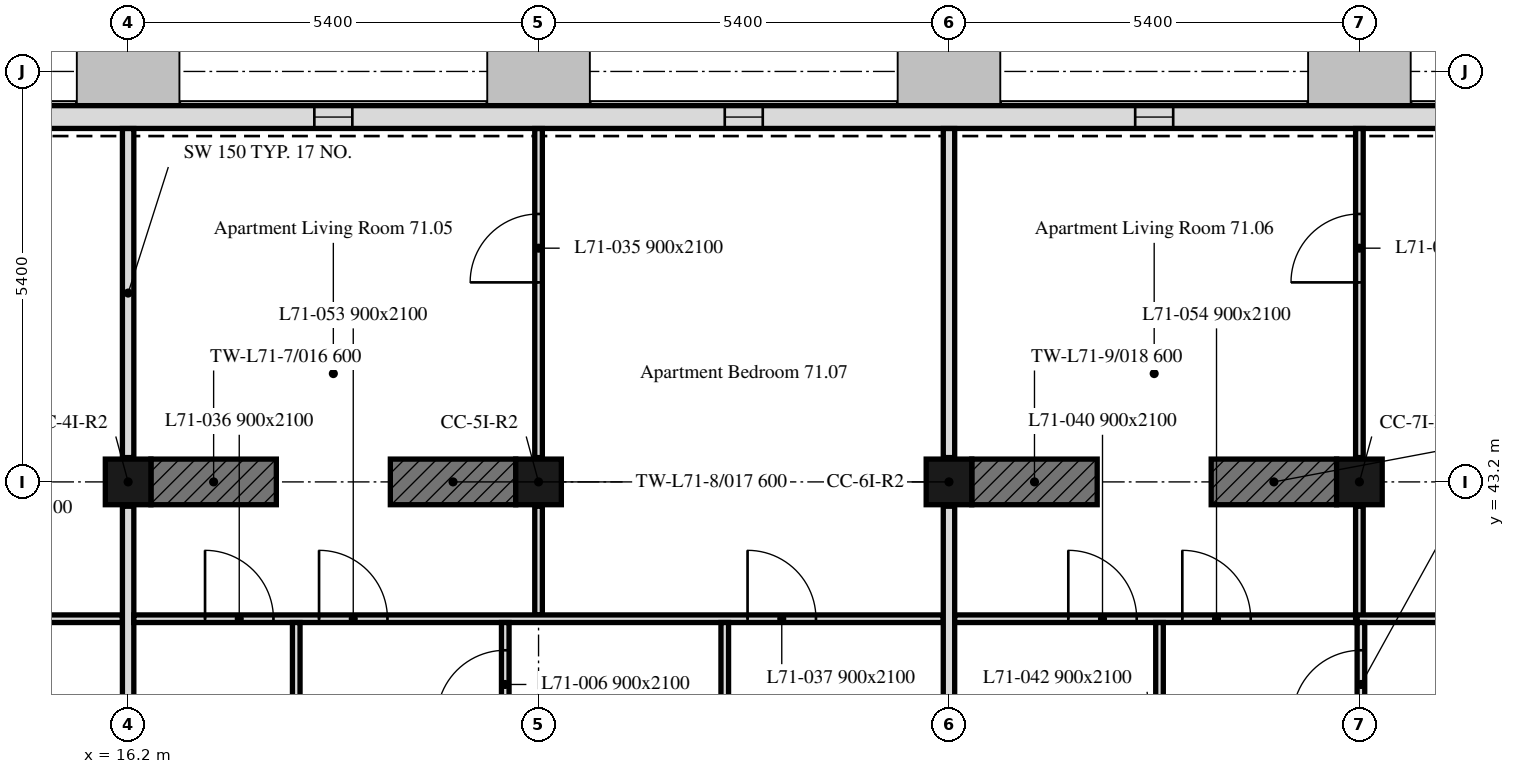
"""IFC4 building model, lengths in metres.
Left out: names, types, materials, properties, quantities, classifications, styles, units other than length and angle.
Written with IfcOpenShell. Run it as: python <this file> out.ifc"""

import sys

from ifc_helpers import new_model, si_unit, direction, frame, frame_2d, origin, origin_2d, place, context, subcontext, project, spatial, rectangle, extrude, element, fill, save


model = new_model("IFC4")
c1 = context("Model", 3, precision=1e-05, world=origin(), true_north=direction((0.0, 1.0)))
c2 = subcontext(c1, "Body", "Model", "MODEL_VIEW")
j1 = project(units=[si_unit("LENGTHUNIT", "METRE"), si_unit("PLANEANGLEUNIT", "RADIAN")], contexts=[c1])
p1 = place(None, origin())
s1 = spatial("IfcSite", under=j1, at=p1, CompositionType="ELEMENT")
p2 = place(p1, origin())
s2 = spatial("IfcBuilding", under=s1, at=p2, CompositionType="ELEMENT")
p3 = place(p2, frame((0.0, 0.0, 288.4)))
s3 = spatial("IfcBuildingStorey", under=s2, at=p3, CompositionType="ELEMENT", Elevation=288.4)
for number, where, z_axis, x_axis in (
    (1, (16.2, 43.2, 0.0), (0.0, 0.0, 1.0), (1.0, 0.0, 0.0)),
    (2, (21.6, 43.2, 0.0), (0.0, 0.0, 1.0), (1.0, 0.0, 0.0)),
    (3, (27.0, 43.2, 0.0), (0.0, 0.0, 1.0), (1.0, 0.0, 0.0)),
    (4, (32.4, 43.2, 0.0), (0.0, 0.0, 1.0), (1.0, 0.0, 0.0)),
):
    element("IfcColumn", number, at=place(p3, frame(where, z_axis=z_axis, x_axis=x_axis)), inside=s3, PredefinedType="COLUMN", context=c2, shape_type="SweptSolid", body=[
        extrude(rectangle(XDim=0.6, YDim=0.6, at=origin_2d()), origin(), (0.0, 0.0, 1.0), 3.0),
    ])
p4 = place(p3, frame((16.5, 43.2, 0.0), z_axis=(0.0, 0.0, 1.0), x_axis=(1.0, 0.0, 0.0)))
e5 = element("IfcWall", 5, at=p4, inside=s3, PredefinedType="SHEAR", context=c2, shape_type="SweptSolid", body=[
    extrude(rectangle(XDim=1.65, YDim=0.6, at=frame_2d((0.825, 0.0))), origin(), (0.0, 0.0, 1.0), 3.0),
])
p5 = place(p3, frame((19.65, 43.2, 0.0), z_axis=(0.0, 0.0, 1.0), x_axis=(1.0, 0.0, 0.0)))
e6 = element("IfcWall", 6, at=p5, inside=s3, PredefinedType="SHEAR", context=c2, shape_type="SweptSolid", body=[
    extrude(rectangle(XDim=1.65, YDim=0.6, at=frame_2d((0.825, 0.0))), origin(), (0.0, 0.0, 1.0), 3.0),
])
p6 = place(p3, frame((27.3, 43.2, 0.0), z_axis=(0.0, 0.0, 1.0), x_axis=(1.0, 0.0, 0.0)))
e7 = element("IfcWall", 7, at=p6, inside=s3, PredefinedType="SHEAR", context=c2, shape_type="SweptSolid", body=[
    extrude(rectangle(XDim=1.65, YDim=0.6, at=frame_2d((0.825, 0.0))), origin(), (0.0, 0.0, 1.0), 3.0),
])
p7 = place(p3, frame((30.45, 43.2, 0.0), z_axis=(0.0, 0.0, 1.0), x_axis=(1.0, 0.0, 0.0)))
e8 = element("IfcWall", 8, at=p7, inside=s3, PredefinedType="SHEAR", context=c2, shape_type="SweptSolid", body=[
    extrude(rectangle(XDim=1.65, YDim=0.6, at=frame_2d((0.825, 0.0))), origin(), (0.0, 0.0, 1.0), 3.0),
])
p8 = place(p3, frame((43.014, 48.0, 0.0), z_axis=(0.0, 0.0, 1.0), x_axis=(-1.0, 0.0, 0.0)))
e9 = element("IfcWall", 9, at=p8, inside=s3, PredefinedType="SOLIDWALL", context=c2, shape_type="SweptSolid", body=[
    extrude(rectangle(XDim=32.027, YDim=0.3, at=frame_2d((16.014, 0.0))), origin(), (0.0, 0.0, 1.0), 3.0),
])
p9 = place(p8, frame((0.814, 0.0, 0.9)))
e10 = element("IfcOpeningElement", 10, at=p9, cuts=e9, PredefinedType="OPENING", context=c2, shape_type="SweptSolid", body=[
    extrude(rectangle(XDim=3.4, YDim=1.7, at=frame_2d((1.7, 0.85))), frame((0.0, 0.16, 0.0), z_axis=(0.0, -1.0, 0.0), x_axis=(1.0, 0.0, 0.0)), (0.0, 0.0, 1.0), 0.32),
])
p10 = place(p8, frame((7.664, 0.0, 0.9)))
e11 = element("IfcOpeningElement", 11, at=p10, cuts=e9, PredefinedType="OPENING", context=c2, shape_type="SweptSolid", body=[
    extrude(rectangle(XDim=0.5, YDim=1.7, at=frame_2d((0.25, 0.85))), frame((0.0, 0.16, 0.0), z_axis=(0.0, -1.0, 0.0), x_axis=(1.0, 0.0, 0.0)), (0.0, 0.0, 1.0), 0.32),
])
p11 = place(p8, frame((13.064, 0.0, 0.9)))
e12 = element("IfcOpeningElement", 12, at=p11, cuts=e9, PredefinedType="OPENING", context=c2, shape_type="SweptSolid", body=[
    extrude(rectangle(XDim=0.5, YDim=1.7, at=frame_2d((0.25, 0.85))), frame((0.0, 0.16, 0.0), z_axis=(0.0, -1.0, 0.0), x_axis=(1.0, 0.0, 0.0)), (0.0, 0.0, 1.0), 0.32),
])
p12 = place(p8, frame((18.464, 0.0, 0.9)))
e13 = element("IfcOpeningElement", 13, at=p12, cuts=e9, PredefinedType="OPENING", context=c2, shape_type="SweptSolid", body=[
    extrude(rectangle(XDim=0.5, YDim=1.7, at=frame_2d((0.25, 0.85))), frame((0.0, 0.16, 0.0), z_axis=(0.0, -1.0, 0.0), x_axis=(1.0, 0.0, 0.0)), (0.0, 0.0, 1.0), 0.32),
])
p13 = place(p8, frame((23.864, 0.0, 0.9)))
e14 = element("IfcOpeningElement", 14, at=p13, cuts=e9, PredefinedType="OPENING", context=c2, shape_type="SweptSolid", body=[
    extrude(rectangle(XDim=0.5, YDim=1.7, at=frame_2d((0.25, 0.85))), frame((0.0, 0.16, 0.0), z_axis=(0.0, -1.0, 0.0), x_axis=(1.0, 0.0, 0.0)), (0.0, 0.0, 1.0), 0.32),
])
p14 = place(p8, frame((28.164, 0.0, 0.9)))
e15 = element("IfcOpeningElement", 15, at=p14, cuts=e9, PredefinedType="OPENING", context=c2, shape_type="SweptSolid", body=[
    extrude(rectangle(XDim=1.1, YDim=1.7, at=frame_2d((0.55, 0.85))), frame((0.0, 0.16, 0.0), z_axis=(0.0, -1.0, 0.0), x_axis=(1.0, 0.0, 0.0)), (0.0, 0.0, 1.0), 0.32),
])
p15 = place(p3, frame((16.2, 43.52, 0.0), z_axis=(0.0, 0.0, 1.0), x_axis=(0.0, 1.0, 0.0)))
e16 = element("IfcWall", 16, at=p15, inside=s3, PredefinedType="PARTITIONING", context=c2, shape_type="SweptSolid", body=[
    extrude(rectangle(XDim=4.329, YDim=0.15, at=frame_2d((2.165, 0.0))), origin(), (0.0, 0.0, 1.0), 2.4),
])
p16 = place(p3, frame((10.89, 41.4, 0.0), z_axis=(0.0, 0.0, 1.0), x_axis=(1.0, 0.0, 0.0)))
e17 = element("IfcWall", 17, at=p16, inside=s3, PredefinedType="PARTITIONING", context=c2, shape_type="SweptSolid", body=[
    extrude(rectangle(XDim=5.235, YDim=0.1, at=frame_2d((2.618, 0.0))), origin(), (0.0, 0.0, 1.0), 3.0),
])
p17 = place(p16, frame((3.15, 0.0, 0.0)))
e18 = element("IfcOpeningElement", 18, at=p17, cuts=e17, PredefinedType="OPENING", context=c2, shape_type="SweptSolid", body=[
    extrude(rectangle(XDim=0.9, YDim=2.1, at=frame_2d((0.45, 1.05))), frame((0.0, 0.05, 0.0), z_axis=(0.0, -1.0, 0.0), x_axis=(1.0, 0.0, 0.0)), (0.0, 0.0, 1.0), 0.1),
])
p18 = place(p3, frame((16.2, 38.12, 0.0), z_axis=(0.0, 0.0, 1.0), x_axis=(0.0, 1.0, 0.0)))
e19 = element("IfcWall", 19, at=p18, inside=s3, PredefinedType="PARTITIONING", context=c2, shape_type="SweptSolid", body=[
    extrude(rectangle(XDim=4.76, YDim=0.15, at=frame_2d((2.38, 0.0))), origin(), (0.0, 0.0, 1.0), 2.4),
])
p19 = place(p3, frame((21.6, 41.45, 0.0), z_axis=(0.0, 0.0, 1.0), x_axis=(0.0, 1.0, 0.0)))
e20 = element("IfcWall", 20, at=p19, inside=s3, PredefinedType="PARTITIONING", context=c2, shape_type="SweptSolid", body=[
    extrude(rectangle(XDim=1.43, YDim=0.1, at=frame_2d((0.715, 0.0))), origin(), (0.0, 0.0, 1.0), 2.4),
])
p20 = place(p3, frame((21.6, 43.52, 0.0), z_axis=(0.0, 0.0, 1.0), x_axis=(0.0, 1.0, 0.0)))
e21 = element("IfcWall", 21, at=p20, inside=s3, PredefinedType="PARTITIONING", context=c2, shape_type="SweptSolid", body=[
    extrude(rectangle(XDim=4.329, YDim=0.1, at=frame_2d((2.165, 0.0))), origin(), (0.0, 0.0, 1.0), 2.4),
])
p21 = place(p20, frame((2.305, 0.0, 0.0)))
e22 = element("IfcOpeningElement", 22, at=p21, cuts=e21, PredefinedType="OPENING", context=c2, shape_type="SweptSolid", body=[
    extrude(rectangle(XDim=0.9, YDim=2.1, at=frame_2d((0.45, 1.05))), frame((0.0, 0.05, 0.0), z_axis=(0.0, -1.0, 0.0), x_axis=(1.0, 0.0, 0.0)), (0.0, 0.0, 1.0), 0.1),
])
p22 = place(p3, frame((27.0, 43.52, 0.0), z_axis=(0.0, 0.0, 1.0), x_axis=(0.0, 1.0, 0.0)))
e23 = element("IfcWall", 23, at=p22, inside=s3, PredefinedType="PARTITIONING", context=c2, shape_type="SweptSolid", body=[
    extrude(rectangle(XDim=4.329, YDim=0.15, at=frame_2d((2.165, 0.0))), origin(), (0.0, 0.0, 1.0), 2.4),
])
p23 = place(p3, frame((16.275, 41.4, 0.0), z_axis=(0.0, 0.0, 1.0), x_axis=(1.0, 0.0, 0.0)))
e24 = element("IfcWall", 24, at=p23, inside=s3, PredefinedType="PARTITIONING", context=c2, shape_type="SweptSolid", body=[
    extrude(rectangle(XDim=10.65, YDim=0.1, at=frame_2d((5.325, 0.0))), origin(), (0.0, 0.0, 1.0), 2.4),
])
p24 = place(p23, frame((0.937, 0.0, 0.0)))
e25 = element("IfcOpeningElement", 25, at=p24, cuts=e24, PredefinedType="OPENING", context=c2, shape_type="SweptSolid", body=[
    extrude(rectangle(XDim=0.9, YDim=2.1, at=frame_2d((0.45, 1.05))), frame((0.0, 0.05, 0.0), z_axis=(0.0, -1.0, 0.0), x_axis=(1.0, 0.0, 0.0)), (0.0, 0.0, 1.0), 0.1),
])
p25 = place(p23, frame((8.075, 0.0, 0.0)))
e26 = element("IfcOpeningElement", 26, at=p25, cuts=e24, PredefinedType="OPENING", context=c2, shape_type="SweptSolid", body=[
    extrude(rectangle(XDim=0.9, YDim=2.1, at=frame_2d((0.45, 1.05))), frame((0.0, 0.05, 0.0), z_axis=(0.0, -1.0, 0.0), x_axis=(1.0, 0.0, 0.0)), (0.0, 0.0, 1.0), 0.1),
])
p26 = place(p23, frame((2.437, 0.0, 0.0)))
e27 = element("IfcOpeningElement", 27, at=p26, cuts=e24, PredefinedType="OPENING", context=c2, shape_type="SweptSolid", body=[
    extrude(rectangle(XDim=0.9, YDim=2.1, at=frame_2d((0.45, 1.05))), frame((0.0, 0.05, 0.0), z_axis=(0.0, -1.0, 0.0), x_axis=(1.0, 0.0, 0.0)), (0.0, 0.0, 1.0), 0.1),
])
p27 = place(p3, frame((18.412, 34.725, 0.0), z_axis=(0.0, 0.0, 1.0), x_axis=(0.0, 1.0, 0.0)))
e28 = element("IfcWall", 28, at=p27, inside=s3, PredefinedType="PARTITIONING", context=c2, shape_type="SweptSolid", body=[
    extrude(rectangle(XDim=6.625, YDim=0.1, at=frame_2d((3.312, 0.0))), origin(), (0.0, 0.0, 1.0), 3.0),
])
p28 = place(p27, frame((0.558, 0.0, 0.0)))
e29 = element("IfcOpeningElement", 29, at=p28, cuts=e28, PredefinedType="OPENING", context=c2, shape_type="SweptSolid", body=[
    extrude(rectangle(XDim=0.9, YDim=2.1, at=frame_2d((0.45, 1.05))), frame((0.0, 0.05, 0.0), z_axis=(0.0, -1.0, 0.0), x_axis=(1.0, 0.0, 0.0)), (0.0, 0.0, 1.0), 0.1),
])
p29 = place(p27, frame((4.673, 0.0, 0.0)))
e30 = element("IfcOpeningElement", 30, at=p29, cuts=e28, PredefinedType="OPENING", context=c2, shape_type="SweptSolid", body=[
    extrude(rectangle(XDim=0.9, YDim=2.1, at=frame_2d((0.45, 1.05))), frame((0.0, 0.05, 0.0), z_axis=(0.0, -1.0, 0.0), x_axis=(1.0, 0.0, 0.0)), (0.0, 0.0, 1.0), 0.1),
])
p30 = place(p3, frame((21.162, 34.725, 0.0), z_axis=(0.0, 0.0, 1.0), x_axis=(0.0, 1.0, 0.0)))
e31 = element("IfcWall", 31, at=p30, inside=s3, PredefinedType="PARTITIONING", context=c2, shape_type="SweptSolid", body=[
    extrude(rectangle(XDim=6.625, YDim=0.1, at=frame_2d((3.312, 0.0))), origin(), (0.0, 0.0, 1.0), 3.0),
])
p31 = place(p30, frame((5.36, 0.0, 0.0)))
e32 = element("IfcOpeningElement", 32, at=p31, cuts=e31, PredefinedType="OPENING", context=c2, shape_type="SweptSolid", body=[
    extrude(rectangle(XDim=0.9, YDim=2.1, at=frame_2d((0.45, 1.05))), frame((0.0, 0.05, 0.0), z_axis=(0.0, -1.0, 0.0), x_axis=(1.0, 0.0, 0.0)), (0.0, 0.0, 1.0), 0.1),
])
p32 = place(p30, frame((0.25, 0.0, 0.0)))
e33 = element("IfcOpeningElement", 33, at=p32, cuts=e31, PredefinedType="OPENING", context=c2, shape_type="SweptSolid", body=[
    extrude(rectangle(XDim=0.9, YDim=2.1, at=frame_2d((0.45, 1.05))), frame((0.0, 0.05, 0.0), z_axis=(0.0, -1.0, 0.0), x_axis=(1.0, 0.0, 0.0)), (0.0, 0.0, 1.0), 0.1),
])
p33 = place(p3, frame((24.05, 34.725, 0.0), z_axis=(0.0, 0.0, 1.0), x_axis=(0.0, 1.0, 0.0)))
e34 = element("IfcWall", 34, at=p33, inside=s3, PredefinedType="PARTITIONING", context=c2, shape_type="SweptSolid", body=[
    extrude(rectangle(XDim=6.625, YDim=0.1, at=frame_2d((3.312, 0.0))), origin(), (0.0, 0.0, 1.0), 3.0),
])
p34 = place(p3, frame((27.0, 38.12, 0.0), z_axis=(0.0, 0.0, 1.0), x_axis=(0.0, 1.0, 0.0)))
e35 = element("IfcWall", 35, at=p34, inside=s3, PredefinedType="PARTITIONING", context=c2, shape_type="SweptSolid", body=[
    extrude(rectangle(XDim=4.76, YDim=0.15, at=frame_2d((2.38, 0.0))), origin(), (0.0, 0.0, 1.0), 2.4),
])
p35 = place(p3, frame((32.4, 41.35, 0.0), z_axis=(0.0, 0.0, 1.0), x_axis=(0.0, 1.0, 0.0)))
e36 = element("IfcWall", 36, at=p35, inside=s3, PredefinedType="PARTITIONING", context=c2, shape_type="SweptSolid", body=[
    extrude(rectangle(XDim=1.53, YDim=0.1, at=frame_2d((0.765, 0.0))), origin(), (0.0, 0.0, 1.0), 2.4),
])
p36 = place(p3, frame((32.4, 43.52, 0.0), z_axis=(0.0, 0.0, 1.0), x_axis=(0.0, 1.0, 0.0)))
e37 = element("IfcWall", 37, at=p36, inside=s3, PredefinedType="PARTITIONING", context=c2, shape_type="SweptSolid", body=[
    extrude(rectangle(XDim=4.329, YDim=0.1, at=frame_2d((2.165, 0.0))), origin(), (0.0, 0.0, 1.0), 2.4),
])
p37 = place(p36, frame((2.305, 0.0, 0.0)))
e38 = element("IfcOpeningElement", 38, at=p37, cuts=e37, PredefinedType="OPENING", context=c2, shape_type="SweptSolid", body=[
    extrude(rectangle(XDim=0.9, YDim=2.1, at=frame_2d((0.45, 1.05))), frame((0.0, 0.05, 0.0), z_axis=(0.0, -1.0, 0.0), x_axis=(1.0, 0.0, 0.0)), (0.0, 0.0, 1.0), 0.1),
])
p38 = place(p3, frame((27.075, 41.4, 0.0), z_axis=(0.0, 0.0, 1.0), x_axis=(1.0, 0.0, 0.0)))
e39 = element("IfcWall", 39, at=p38, inside=s3, PredefinedType="PARTITIONING", context=c2, shape_type="SweptSolid", body=[
    extrude(rectangle(XDim=5.275, YDim=0.1, at=frame_2d((2.638, 0.0))), origin(), (0.0, 0.0, 1.0), 3.0),
])
p39 = place(p38, frame((1.495, 0.0, 0.0)))
e40 = element("IfcOpeningElement", 40, at=p39, cuts=e39, PredefinedType="OPENING", context=c2, shape_type="SweptSolid", body=[
    extrude(rectangle(XDim=0.9, YDim=2.1, at=frame_2d((0.45, 1.05))), frame((0.0, 0.05, 0.0), z_axis=(0.0, -1.0, 0.0), x_axis=(1.0, 0.0, 0.0)), (0.0, 0.0, 1.0), 0.1),
])
p40 = place(p38, frame((2.995, 0.0, 0.0)))
e41 = element("IfcOpeningElement", 41, at=p40, cuts=e39, PredefinedType="OPENING", context=c2, shape_type="SweptSolid", body=[
    extrude(rectangle(XDim=0.9, YDim=2.1, at=frame_2d((0.45, 1.05))), frame((0.0, 0.05, 0.0), z_axis=(0.0, -1.0, 0.0), x_axis=(1.0, 0.0, 0.0)), (0.0, 0.0, 1.0), 0.1),
])
p41 = place(p3, frame((32.37, 41.4, 0.0), z_axis=(0.0, 0.0, 1.0), x_axis=(1.0, 0.0, 0.0)))
e42 = element("IfcWall", 42, at=p41, inside=s3, PredefinedType="PARTITIONING", context=c2, shape_type="SweptSolid", body=[
    extrude(rectangle(XDim=5.355, YDim=0.1, at=frame_2d((2.677, 0.0))), origin(), (0.0, 0.0, 1.0), 3.0),
])
p42 = place(p41, frame((2.578, 0.0, 0.0)))
e43 = element("IfcOpeningElement", 43, at=p42, cuts=e42, PredefinedType="OPENING", context=c2, shape_type="SweptSolid", body=[
    extrude(rectangle(XDim=0.9, YDim=2.1, at=frame_2d((0.45, 1.05))), frame((0.0, 0.05, 0.0), z_axis=(0.0, -1.0, 0.0), x_axis=(1.0, 0.0, 0.0)), (0.0, 0.0, 1.0), 0.1),
])
p43 = place(p3, frame((29.77, 34.725, 0.0), z_axis=(0.0, 0.0, 1.0), x_axis=(0.0, 1.0, 0.0)))
e44 = element("IfcWall", 44, at=p43, inside=s3, PredefinedType="PARTITIONING", context=c2, shape_type="SweptSolid", body=[
    extrude(rectangle(XDim=6.625, YDim=0.1, at=frame_2d((3.312, 0.0))), origin(), (0.0, 0.0, 1.0), 3.0),
])
p44 = place(p43, frame((0.725, 0.0, 0.0)))
e45 = element("IfcOpeningElement", 45, at=p44, cuts=e44, PredefinedType="OPENING", context=c2, shape_type="SweptSolid", body=[
    extrude(rectangle(XDim=0.9, YDim=2.1, at=frame_2d((0.45, 1.05))), frame((0.0, 0.05, 0.0), z_axis=(0.0, -1.0, 0.0), x_axis=(1.0, 0.0, 0.0)), (0.0, 0.0, 1.0), 0.1),
])
p45 = place(p43, frame((4.1, 0.0, 0.0)))
e46 = element("IfcOpeningElement", 46, at=p45, cuts=e44, PredefinedType="OPENING", context=c2, shape_type="SweptSolid", body=[
    extrude(rectangle(XDim=0.9, YDim=2.1, at=frame_2d((0.45, 1.05))), frame((0.0, 0.05, 0.0), z_axis=(0.0, -1.0, 0.0), x_axis=(1.0, 0.0, 0.0)), (0.0, 0.0, 1.0), 0.1),
])
p46 = place(p3, frame((32.42, 38.12, 0.0), z_axis=(0.0, 0.0, 1.0), x_axis=(0.0, 1.0, 0.0)))
e47 = element("IfcWall", 47, at=p46, inside=s3, PredefinedType="PARTITIONING", context=c2, shape_type="SweptSolid", body=[
    extrude(rectangle(XDim=3.23, YDim=0.1, at=frame_2d((1.615, 0.0))), origin(), (0.0, 0.0, 1.0), 2.4),
])
p47 = place(p46, frame((1.965, 0.0, 0.0)))
e48 = element("IfcOpeningElement", 48, at=p47, cuts=e47, PredefinedType="OPENING", context=c2, shape_type="SweptSolid", body=[
    extrude(rectangle(XDim=0.9, YDim=2.1, at=frame_2d((0.45, 1.05))), frame((0.0, 0.05, 0.0), z_axis=(0.0, -1.0, 0.0), x_axis=(1.0, 0.0, 0.0)), (0.0, 0.0, 1.0), 0.1),
])
p48 = place(p11, origin())
e49 = element("IfcWindow", 49, at=p48, inside=s3, PartitioningType="SINGLE_PANEL", PredefinedType="WINDOW", context=c2, shape_type="SweptSolid", body=[
    extrude(rectangle(XDim=0.5, YDim=1.7, at=frame_2d((0.25, 0.85))), frame((0.0, 0.03, 0.0), z_axis=(0.0, -1.0, 0.0), x_axis=(1.0, 0.0, 0.0)), (0.0, 0.0, 1.0), 0.06),
])
fill(e12, e49)
p49 = place(p12, origin())
e50 = element("IfcWindow", 50, at=p49, inside=s3, PartitioningType="SINGLE_PANEL", PredefinedType="WINDOW", context=c2, shape_type="SweptSolid", body=[
    extrude(rectangle(XDim=0.5, YDim=1.7, at=frame_2d((0.25, 0.85))), frame((0.0, 0.03, 0.0), z_axis=(0.0, -1.0, 0.0), x_axis=(1.0, 0.0, 0.0)), (0.0, 0.0, 1.0), 0.06),
])
fill(e13, e50)
p50 = place(p13, origin())
e51 = element("IfcWindow", 51, at=p50, inside=s3, PartitioningType="SINGLE_PANEL", PredefinedType="WINDOW", context=c2, shape_type="SweptSolid", body=[
    extrude(rectangle(XDim=0.5, YDim=1.7, at=frame_2d((0.25, 0.85))), frame((0.0, 0.03, 0.0), z_axis=(0.0, -1.0, 0.0), x_axis=(1.0, 0.0, 0.0)), (0.0, 0.0, 1.0), 0.06),
])
fill(e14, e51)
p51 = place(p31, origin())
e52 = element("IfcDoor", 52, at=p51, inside=s3, OperationType="SINGLE_SWING_LEFT", PredefinedType="DOOR", context=c2, shape_type="SweptSolid", body=[
    extrude(rectangle(XDim=0.9, YDim=2.1, at=frame_2d((0.45, 1.05))), frame((0.0, 0.025, 0.0), z_axis=(0.0, -1.0, 0.0), x_axis=(1.0, 0.0, 0.0)), (0.0, 0.0, 1.0), 0.05),
])
fill(e32, e52)
p52 = place(p47, origin())
e53 = element("IfcDoor", 53, at=p52, inside=s3, OperationType="SINGLE_SWING_RIGHT", PredefinedType="DOOR", context=c2, shape_type="SweptSolid", body=[
    extrude(rectangle(XDim=0.9, YDim=2.1, at=frame_2d((0.45, 1.05))), frame((0.0, 0.025, 0.0), z_axis=(0.0, -1.0, 0.0), x_axis=(1.0, 0.0, 0.0)), (0.0, 0.0, 1.0), 0.05),
])
fill(e48, e53)
p53 = place(p21, origin())
e54 = element("IfcDoor", 54, at=p53, inside=s3, OperationType="SINGLE_SWING_RIGHT", PredefinedType="DOOR", context=c2, shape_type="SweptSolid", body=[
    extrude(rectangle(XDim=0.9, YDim=2.1, at=frame_2d((0.45, 1.05))), frame((0.0, 0.025, 0.0), z_axis=(0.0, -1.0, 0.0), x_axis=(1.0, 0.0, 0.0)), (0.0, 0.0, 1.0), 0.05),
])
fill(e22, e54)
p54 = place(p24, origin())
e55 = element("IfcDoor", 55, at=p54, inside=s3, OperationType="SINGLE_SWING_RIGHT", PredefinedType="DOOR", context=c2, shape_type="SweptSolid", body=[
    extrude(rectangle(XDim=0.9, YDim=2.1, at=frame_2d((0.45, 1.05))), frame((0.0, 0.025, 0.0), z_axis=(0.0, -1.0, 0.0), x_axis=(1.0, 0.0, 0.0)), (0.0, 0.0, 1.0), 0.05),
])
fill(e25, e55)
p55 = place(p25, origin())
e56 = element("IfcDoor", 56, at=p55, inside=s3, OperationType="SINGLE_SWING_LEFT", PredefinedType="DOOR", context=c2, shape_type="SweptSolid", body=[
    extrude(rectangle(XDim=0.9, YDim=2.1, at=frame_2d((0.45, 1.05))), frame((0.0, 0.025, 0.0), z_axis=(0.0, -1.0, 0.0), x_axis=(1.0, 0.0, 0.0)), (0.0, 0.0, 1.0), 0.05),
])
fill(e26, e56)
p56 = place(p37, origin())
e57 = element("IfcDoor", 57, at=p56, inside=s3, OperationType="SINGLE_SWING_LEFT", PredefinedType="DOOR", context=c2, shape_type="SweptSolid", body=[
    extrude(rectangle(XDim=0.9, YDim=2.1, at=frame_2d((0.45, 1.05))), frame((0.0, 0.025, 0.0), z_axis=(0.0, -1.0, 0.0), x_axis=(1.0, 0.0, 0.0)), (0.0, 0.0, 1.0), 0.05),
])
fill(e38, e57)
p57 = place(p39, origin())
e58 = element("IfcDoor", 58, at=p57, inside=s3, OperationType="SINGLE_SWING_RIGHT", PredefinedType="DOOR", context=c2, shape_type="SweptSolid", body=[
    extrude(rectangle(XDim=0.9, YDim=2.1, at=frame_2d((0.45, 1.05))), frame((0.0, 0.025, 0.0), z_axis=(0.0, -1.0, 0.0), x_axis=(1.0, 0.0, 0.0)), (0.0, 0.0, 1.0), 0.05),
])
fill(e40, e58)
p58 = place(p26, origin())
e59 = element("IfcDoor", 59, at=p58, inside=s3, OperationType="SINGLE_SWING_LEFT", PredefinedType="DOOR", context=c2, shape_type="SweptSolid", body=[
    extrude(rectangle(XDim=0.9, YDim=2.1, at=frame_2d((0.45, 1.05))), frame((0.0, 0.025, 0.0), z_axis=(0.0, -1.0, 0.0), x_axis=(1.0, 0.0, 0.0)), (0.0, 0.0, 1.0), 0.05),
])
fill(e27, e59)
p59 = place(p40, origin())
e60 = element("IfcDoor", 60, at=p59, inside=s3, OperationType="SINGLE_SWING_LEFT", PredefinedType="DOOR", context=c2, shape_type="SweptSolid", body=[
    extrude(rectangle(XDim=0.9, YDim=2.1, at=frame_2d((0.45, 1.05))), frame((0.0, 0.025, 0.0), z_axis=(0.0, -1.0, 0.0), x_axis=(1.0, 0.0, 0.0)), (0.0, 0.0, 1.0), 0.05),
])
fill(e41, e60)
save(model, sys.argv[1])
